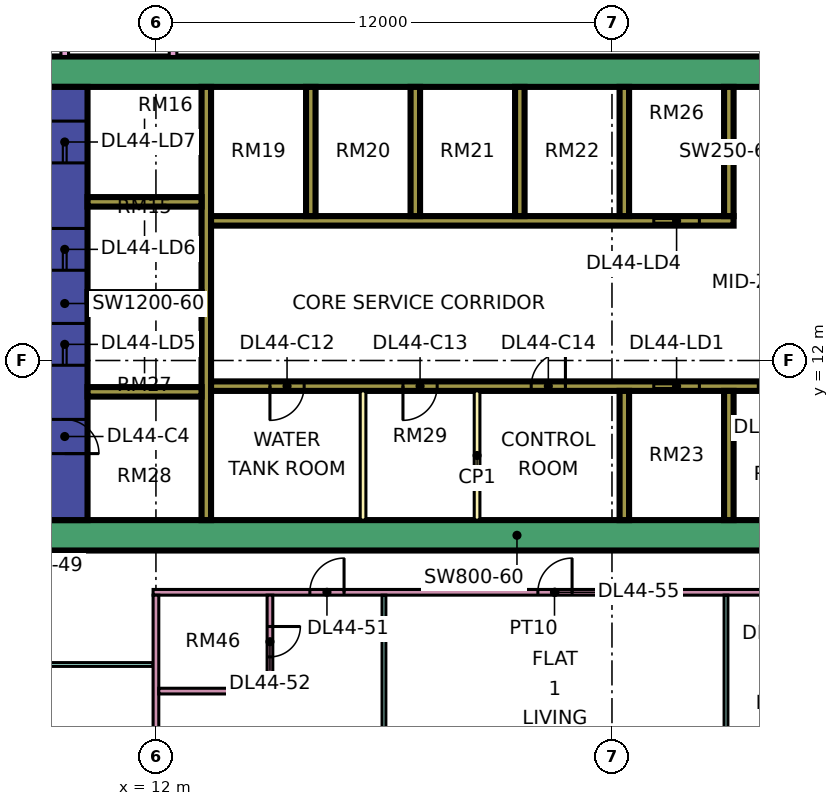
"""IFC4 building model, lengths in metres.
Left out: names, types, materials, properties, quantities, classifications, styles, units other than length and angle.
Written with IfcOpenShell. Run it as: python <this file> out.ifc"""

import sys

from ifc_helpers import new_model, si_unit, direction, frame, frame_2d, origin, place, context, subcontext, project, spatial, rectangle, extrude, element, fill, save


model = new_model("IFC4")
c1 = context("Model", 3, precision=1e-05, world=origin(), true_north=direction((0.0, 1.0)))
c2 = subcontext(c1, "Body", "Model", "MODEL_VIEW")
j1 = project(units=[si_unit("LENGTHUNIT", "METRE"), si_unit("PLANEANGLEUNIT", "RADIAN")], contexts=[c1])
p1 = place(None, origin())
s1 = spatial("IfcSite", under=j1, at=p1, CompositionType="ELEMENT")
p2 = place(p1, origin())
s2 = spatial("IfcBuilding", under=s1, at=p2, CompositionType="ELEMENT")
p3 = place(p2, frame((0.0, 0.0, 191.15)))
s3 = spatial("IfcBuildingStorey", under=s2, at=p3, CompositionType="ELEMENT", Elevation=191.15)
p4 = place(p3, frame((9.0, 7.4, 0.0), z_axis=(0.0, 0.0, 1.0), x_axis=(1.0, 0.0, 0.0)))
e1 = element("IfcWall", 1, at=p4, inside=s3, PredefinedType="SHEAR", context=c2, shape_type="SweptSolid", body=[
    extrude(rectangle(XDim=25.0, YDim=0.8, at=frame_2d((12.5, 0.0))), origin(), (0.0, 0.0, 1.0), 3.75),
])
p5 = place(p3, frame((9.0, 19.6, 0.0), z_axis=(0.0, 0.0, 1.0), x_axis=(1.0, 0.0, 0.0)))
e2 = element("IfcWall", 2, at=p5, inside=s3, PredefinedType="SHEAR", context=c2, shape_type="SweptSolid", body=[
    extrude(rectangle(XDim=25.0, YDim=0.8, at=frame_2d((12.5, 0.0))), origin(), (0.0, 0.0, 1.0), 3.75),
])
p6 = place(p5, frame((19.1, 0.0, 0.0)))
e3 = element("IfcOpeningElement", 3, at=p6, cuts=e2, PredefinedType="OPENING", context=c2, shape_type="SweptSolid", body=[
    extrude(rectangle(XDim=1.8, YDim=2.4, at=frame_2d((0.9, 1.2))), frame((0.0, 0.41, 0.0), z_axis=(0.0, -1.0, 0.0), x_axis=(1.0, 0.0, 0.0)), (0.0, 0.0, 1.0), 0.82),
])
p7 = place(p3, frame((9.6, 7.8, 0.0), z_axis=(0.0, 0.0, 1.0), x_axis=(0.0, 1.0, 0.0)))
e4 = element("IfcWall", 4, at=p7, inside=s3, PredefinedType="SHEAR", context=c2, shape_type="SweptSolid", body=[
    extrude(rectangle(XDim=11.4, YDim=1.2, at=frame_2d((5.7, 0.0))), origin(), (0.0, 0.0, 1.0), 3.75),
])
p8 = place(p7, frame((4.075, 0.0, 0.0)))
e5 = element("IfcOpeningElement", 5, at=p8, cuts=e4, PredefinedType="OPENING", context=c2, shape_type="SweptSolid", body=[
    extrude(rectangle(XDim=1.1, YDim=2.2, at=frame_2d((0.55, 1.1))), frame((0.0, 0.61, 0.0), z_axis=(0.0, -1.0, 0.0), x_axis=(1.0, 0.0, 0.0)), (0.0, 0.0, 1.0), 1.22),
])
p9 = place(p7, frame((6.575, 0.0, 0.0)))
e6 = element("IfcOpeningElement", 6, at=p9, cuts=e4, PredefinedType="OPENING", context=c2, shape_type="SweptSolid", body=[
    extrude(rectangle(XDim=1.1, YDim=2.2, at=frame_2d((0.55, 1.1))), frame((0.0, 0.61, 0.0), z_axis=(0.0, -1.0, 0.0), x_axis=(1.0, 0.0, 0.0)), (0.0, 0.0, 1.0), 1.22),
])
p10 = place(p7, frame((9.4, 0.0, 0.0)))
e7 = element("IfcOpeningElement", 7, at=p10, cuts=e4, PredefinedType="OPENING", context=c2, shape_type="SweptSolid", body=[
    extrude(rectangle(XDim=1.1, YDim=2.2, at=frame_2d((0.55, 1.1))), frame((0.0, 0.61, 0.0), z_axis=(0.0, -1.0, 0.0), x_axis=(1.0, 0.0, 0.0)), (0.0, 0.0, 1.0), 1.22),
])
p11 = place(p7, frame((1.75, 0.0, 0.0)))
e8 = element("IfcOpeningElement", 8, at=p11, cuts=e4, PredefinedType="OPENING", context=c2, shape_type="SweptSolid", body=[
    extrude(rectangle(XDim=0.9, YDim=2.1, at=frame_2d((0.45, 1.05))), frame((0.0, 0.61, 0.0), z_axis=(0.0, -1.0, 0.0), x_axis=(1.0, 0.0, 0.0)), (0.0, 0.0, 1.0), 1.22),
])
p12 = place(p3, frame((13.325, 7.8, 0.0), z_axis=(0.0, 0.0, 1.0), x_axis=(0.0, 1.0, 0.0)))
e9 = element("IfcWall", 9, at=p12, inside=s3, PredefinedType="SHEAR", context=c2, shape_type="SweptSolid", body=[
    extrude(rectangle(XDim=11.4, YDim=0.25, at=frame_2d((5.7, 0.0))), origin(), (0.0, 0.0, 1.0), 3.75),
])
p13 = place(p3, frame((13.45, 11.325, 0.0), z_axis=(0.0, 0.0, 1.0), x_axis=(1.0, 0.0, 0.0)))
e10 = element("IfcWall", 10, at=p13, inside=s3, PredefinedType="SHEAR", context=c2, shape_type="SweptSolid", body=[
    extrude(rectangle(XDim=19.75, YDim=0.25, at=frame_2d((9.875, 0.0))), origin(), (0.0, 0.0, 1.0), 3.75),
])
p14 = place(p13, frame((11.65, 0.0, 0.0)))
e11 = element("IfcOpeningElement", 11, at=p14, cuts=e10, PredefinedType="OPENING", context=c2, shape_type="SweptSolid", body=[
    extrude(rectangle(XDim=1.2, YDim=2.2, at=frame_2d((0.6, 1.1))), frame((0.0, 0.135, 0.0), z_axis=(0.0, -1.0, 0.0), x_axis=(1.0, 0.0, 0.0)), (0.0, 0.0, 1.0), 0.27),
])
p15 = place(p13, frame((14.4, 0.0, 0.0)))
e12 = element("IfcOpeningElement", 12, at=p15, cuts=e10, PredefinedType="OPENING", context=c2, shape_type="SweptSolid", body=[
    extrude(rectangle(XDim=1.2, YDim=2.2, at=frame_2d((0.6, 1.1))), frame((0.0, 0.135, 0.0), z_axis=(0.0, -1.0, 0.0), x_axis=(1.0, 0.0, 0.0)), (0.0, 0.0, 1.0), 0.27),
])
p16 = place(p13, frame((17.15, 0.0, 0.0)))
e13 = element("IfcOpeningElement", 13, at=p16, cuts=e10, PredefinedType="OPENING", context=c2, shape_type="SweptSolid", body=[
    extrude(rectangle(XDim=1.2, YDim=2.2, at=frame_2d((0.6, 1.1))), frame((0.0, 0.135, 0.0), z_axis=(0.0, -1.0, 0.0), x_axis=(1.0, 0.0, 0.0)), (0.0, 0.0, 1.0), 0.27),
])
p17 = place(p13, frame((1.55, 0.0, 0.0)))
e14 = element("IfcOpeningElement", 14, at=p17, cuts=e10, PredefinedType="OPENING", context=c2, shape_type="SweptSolid", body=[
    extrude(rectangle(XDim=0.9, YDim=2.1, at=frame_2d((0.45, 1.05))), frame((0.0, 0.135, 0.0), z_axis=(0.0, -1.0, 0.0), x_axis=(1.0, 0.0, 0.0)), (0.0, 0.0, 1.0), 0.27),
])
p18 = place(p13, frame((5.05, 0.0, 0.0)))
e15 = element("IfcOpeningElement", 15, at=p18, cuts=e10, PredefinedType="OPENING", context=c2, shape_type="SweptSolid", body=[
    extrude(rectangle(XDim=0.9, YDim=2.1, at=frame_2d((0.45, 1.05))), frame((0.0, 0.135, 0.0), z_axis=(0.0, -1.0, 0.0), x_axis=(1.0, 0.0, 0.0)), (0.0, 0.0, 1.0), 0.27),
])
p19 = place(p13, frame((8.425, 0.0, 0.0)))
e16 = element("IfcOpeningElement", 16, at=p19, cuts=e10, PredefinedType="OPENING", context=c2, shape_type="SweptSolid", body=[
    extrude(rectangle(XDim=0.9, YDim=2.1, at=frame_2d((0.45, 1.05))), frame((0.0, 0.135, 0.0), z_axis=(0.0, -1.0, 0.0), x_axis=(1.0, 0.0, 0.0)), (0.0, 0.0, 1.0), 0.27),
])
p20 = place(p3, frame((13.45, 15.675, 0.0), z_axis=(0.0, 0.0, 1.0), x_axis=(1.0, 0.0, 0.0)))
e17 = element("IfcWall", 17, at=p20, inside=s3, PredefinedType="SHEAR", context=c2, shape_type="SweptSolid", body=[
    extrude(rectangle(XDim=13.75, YDim=0.25, at=frame_2d((6.875, 0.0))), origin(), (0.0, 0.0, 1.0), 3.75),
])
p21 = place(p20, frame((11.65, 0.0, 0.0)))
e18 = element("IfcOpeningElement", 18, at=p21, cuts=e17, PredefinedType="OPENING", context=c2, shape_type="SweptSolid", body=[
    extrude(rectangle(XDim=1.2, YDim=2.2, at=frame_2d((0.6, 1.1))), frame((0.0, 0.135, 0.0), z_axis=(0.0, -1.0, 0.0), x_axis=(1.0, 0.0, 0.0)), (0.0, 0.0, 1.0), 0.27),
])
for number, where, z_axis, x_axis in (
    (19, (10.2, 11.175, 0.0), (0.0, 0.0, 1.0), (1.0, 0.0, 0.0)),
    (20, (10.2, 13.675, 0.0), (0.0, 0.0, 1.0), (1.0, 0.0, 0.0)),
    (21, (10.2, 16.175, 0.0), (0.0, 0.0, 1.0), (1.0, 0.0, 0.0)),
):
    element("IfcWall", number, at=place(p3, frame(where, z_axis=z_axis, x_axis=x_axis)), inside=s3, PredefinedType="SHEAR", context=c2, shape_type="SweptSolid", body=[
        extrude(rectangle(XDim=3.0, YDim=0.25, at=frame_2d((1.5, 0.0))), origin(), (0.0, 0.0, 1.0), 3.75),
    ])
for number, where, z_axis, x_axis in (
    (22, (24.325, 7.8, 0.0), (0.0, 0.0, 1.0), (0.0, 1.0, 0.0)),
    (23, (27.075, 7.8, 0.0), (0.0, 0.0, 1.0), (0.0, 1.0, 0.0)),
    (24, (16.075, 15.8, 0.0), (0.0, 0.0, 1.0), (0.0, 1.0, 0.0)),
    (25, (18.825, 15.8, 0.0), (0.0, 0.0, 1.0), (0.0, 1.0, 0.0)),
    (26, (21.575, 15.8, 0.0), (0.0, 0.0, 1.0), (0.0, 1.0, 0.0)),
    (27, (24.325, 15.8, 0.0), (0.0, 0.0, 1.0), (0.0, 1.0, 0.0)),
    (28, (27.075, 15.8, 0.0), (0.0, 0.0, 1.0), (0.0, 1.0, 0.0)),
):
    element("IfcWall", number, at=place(p3, frame(where, z_axis=z_axis, x_axis=x_axis)), inside=s3, PredefinedType="SHEAR", context=c2, shape_type="SweptSolid", body=[
        extrude(rectangle(XDim=3.4, YDim=0.25, at=frame_2d((1.7, 0.0))), origin(), (0.0, 0.0, 1.0), 3.75),
    ])
p22 = place(p3, frame((-1.447, 12.553, 0.0), z_axis=(0.0, 0.0, 1.0), x_axis=(0.707106781187, -0.707106781187, 0.0)))
e29 = element("IfcWall", 29, at=p22, inside=s3, PredefinedType="SOLIDWALL", context=c2, shape_type="SweptSolid", body=[
    extrude(rectangle(XDim=19.799, YDim=0.15, at=frame_2d((9.899, 0.0))), origin(), (0.0, 0.0, 1.0), 3.35),
])
p23 = place(p22, frame((2.212, 0.0, 0.45)))
e30 = element("IfcOpeningElement", 30, at=p23, cuts=e29, PredefinedType="OPENING", context=c2, shape_type="SweptSolid", body=[
    extrude(rectangle(XDim=3.0, YDim=2.4, at=frame_2d((1.5, 1.2))), frame((0.0, 0.085, 0.0), z_axis=(0.0, -1.0, 0.0), x_axis=(1.0, 0.0, 0.0)), (0.0, 0.0, 1.0), 0.17),
])
p24 = place(p22, frame((10.216, 0.0, 0.45)))
e31 = element("IfcOpeningElement", 31, at=p24, cuts=e29, PredefinedType="OPENING", context=c2, shape_type="SweptSolid", body=[
    extrude(rectangle(XDim=3.0, YDim=2.4, at=frame_2d((1.5, 1.2))), frame((0.0, 0.085, 0.0), z_axis=(0.0, -1.0, 0.0), x_axis=(1.0, 0.0, 0.0)), (0.0, 0.0, 1.0), 0.17),
])
for number, where, z_axis, x_axis in (
    (32, (17.45, 7.8, 0.0), (0.0, 0.0, 1.0), (0.0, 1.0, 0.0)),
    (33, (20.45, 7.8, 0.0), (0.0, 0.0, 1.0), (0.0, 1.0, 0.0)),
):
    element("IfcWall", number, at=place(p3, frame(where, z_axis=z_axis, x_axis=x_axis)), inside=s3, PredefinedType="PARTITIONING", context=c2, shape_type="SweptSolid", body=[
        extrude(rectangle(XDim=3.4, YDim=0.15, at=frame_2d((1.7, 0.0))), origin(), (0.0, 0.0, 1.0), 3.35),
    ])
p25 = place(p3, frame((9.05, 4.0, 0.0), z_axis=(0.0, 0.0, 1.0), x_axis=(1.0, 0.0, 0.0)))
e34 = element("IfcWall", 34, at=p25, inside=s3, PredefinedType="PARTITIONING", context=c2, shape_type="SweptSolid", body=[
    extrude(rectangle(XDim=2.875, YDim=0.1, at=frame_2d((1.438, 0.0))), origin(), (0.0, 0.0, 1.0), 3.35),
])
p26 = place(p3, frame((9.6, 20.0, 0.0), z_axis=(0.0, 0.0, 1.0), x_axis=(0.0, 1.0, 0.0)))
e35 = element("IfcWall", 35, at=p26, inside=s3, PredefinedType="PARTITIONING", context=c2, shape_type="SweptSolid", body=[
    extrude(rectangle(XDim=42.926, YDim=0.2, at=frame_2d((21.463, 0.0))), origin(), (0.0, 0.0, 1.0), 3.35),
])
p27 = place(p26, frame((31.65, 0.0, 0.0)))
e36 = element("IfcOpeningElement", 36, at=p27, cuts=e35, PredefinedType="OPENING", context=c2, shape_type="SweptSolid", body=[
    extrude(rectangle(XDim=1.0, YDim=2.1, at=frame_2d((0.5, 1.05))), frame((0.0, 0.11, 0.0), z_axis=(0.0, -1.0, 0.0), x_axis=(1.0, 0.0, 0.0)), (0.0, 0.0, 1.0), 0.22),
])
p28 = place(p26, frame((0.6, 0.0, 0.0)))
e37 = element("IfcOpeningElement", 37, at=p28, cuts=e35, PredefinedType="OPENING", context=c2, shape_type="SweptSolid", body=[
    extrude(rectangle(XDim=1.2, YDim=2.1, at=frame_2d((0.6, 1.05))), frame((0.0, 0.11, 0.0), z_axis=(0.0, -1.0, 0.0), x_axis=(1.0, 0.0, 0.0)), (0.0, 0.0, 1.0), 0.22),
])
p29 = place(p26, frame((13.65, 0.0, 0.0)))
e38 = element("IfcOpeningElement", 38, at=p29, cuts=e35, PredefinedType="OPENING", context=c2, shape_type="SweptSolid", body=[
    extrude(rectangle(XDim=1.0, YDim=2.1, at=frame_2d((0.5, 1.05))), frame((0.0, 0.11, 0.0), z_axis=(0.0, -1.0, 0.0), x_axis=(1.0, 0.0, 0.0)), (0.0, 0.0, 1.0), 0.22),
])
p30 = place(p3, frame((11.925, 5.9, 0.0), z_axis=(0.0, 0.0, 1.0), x_axis=(1.0, 0.0, 0.0)))
e39 = element("IfcWall", 39, at=p30, inside=s3, PredefinedType="PARTITIONING", context=c2, shape_type="SweptSolid", body=[
    extrude(rectangle(XDim=21.125, YDim=0.15, at=frame_2d((10.562, 0.0))), origin(), (0.0, 0.0, 1.0), 3.35),
])
p31 = place(p30, frame((16.125, 0.0, 0.0)))
e40 = element("IfcOpeningElement", 40, at=p31, cuts=e39, PredefinedType="OPENING", context=c2, shape_type="SweptSolid", body=[
    extrude(rectangle(XDim=0.9, YDim=2.1, at=frame_2d((0.45, 1.05))), frame((0.0, 0.085, 0.0), z_axis=(0.0, -1.0, 0.0), x_axis=(1.0, 0.0, 0.0)), (0.0, 0.0, 1.0), 0.17),
])
p32 = place(p30, frame((4.125, 0.0, 0.0)))
e41 = element("IfcOpeningElement", 41, at=p32, cuts=e39, PredefinedType="OPENING", context=c2, shape_type="SweptSolid", body=[
    extrude(rectangle(XDim=0.9, YDim=2.1, at=frame_2d((0.45, 1.05))), frame((0.0, 0.085, 0.0), z_axis=(0.0, -1.0, 0.0), x_axis=(1.0, 0.0, 0.0)), (0.0, 0.0, 1.0), 0.17),
])
p33 = place(p30, frame((10.125, 0.0, 0.0)))
e42 = element("IfcOpeningElement", 42, at=p33, cuts=e39, PredefinedType="OPENING", context=c2, shape_type="SweptSolid", body=[
    extrude(rectangle(XDim=0.9, YDim=2.1, at=frame_2d((0.45, 1.05))), frame((0.0, 0.085, 0.0), z_axis=(0.0, -1.0, 0.0), x_axis=(1.0, 0.0, 0.0)), (0.0, 0.0, 1.0), 0.17),
])
p34 = place(p3, frame((12.0, -0.788, 0.0), z_axis=(0.0, 0.0, 1.0), x_axis=(0.0, 1.0, 0.0)))
e43 = element("IfcWall", 43, at=p34, inside=s3, PredefinedType="PARTITIONING", context=c2, shape_type="SweptSolid", body=[
    extrude(rectangle(XDim=6.613, YDim=0.15, at=frame_2d((3.306, 0.0))), origin(), (0.0, 0.0, 1.0), 3.35),
])
p35 = place(p3, frame((12.075, 3.3, 0.0), z_axis=(0.0, 0.0, 1.0), x_axis=(1.0, 0.0, 0.0)))
e44 = element("IfcWall", 44, at=p35, inside=s3, PredefinedType="PARTITIONING", context=c2, shape_type="SweptSolid", body=[
    extrude(rectangle(XDim=3.0, YDim=0.15, at=frame_2d((1.5, 0.0))), origin(), (0.0, 0.0, 1.0), 3.35),
])
p36 = place(p3, frame((12.45, 20.0, 0.0), z_axis=(0.0, 0.0, 1.0), x_axis=(0.0, 1.0, 0.0)))
e45 = element("IfcWall", 45, at=p36, inside=s3, PredefinedType="PARTITIONING", context=c2, shape_type="SweptSolid", body=[
    extrude(rectangle(XDim=43.0, YDim=0.2, at=frame_2d((21.5, 0.0))), origin(), (0.0, 0.0, 1.0), 3.35),
])
p37 = place(p36, frame((6.7, 0.0, 0.0)))
e46 = element("IfcOpeningElement", 46, at=p37, cuts=e45, PredefinedType="OPENING", context=c2, shape_type="SweptSolid", body=[
    extrude(rectangle(XDim=1.6, YDim=2.1, at=frame_2d((0.8, 1.05))), frame((0.0, 0.11, 0.0), z_axis=(0.0, -1.0, 0.0), x_axis=(1.0, 0.0, 0.0)), (0.0, 0.0, 1.0), 0.22),
])
p38 = place(p36, frame((12.95, 0.0, 0.0)))
e47 = element("IfcOpeningElement", 47, at=p38, cuts=e45, PredefinedType="OPENING", context=c2, shape_type="SweptSolid", body=[
    extrude(rectangle(XDim=1.0, YDim=2.1, at=frame_2d((0.5, 1.05))), frame((0.0, 0.11, 0.0), z_axis=(0.0, -1.0, 0.0), x_axis=(1.0, 0.0, 0.0)), (0.0, 0.0, 1.0), 0.22),
])
p39 = place(p36, frame((16.9, 0.0, 0.0)))
e48 = element("IfcOpeningElement", 48, at=p39, cuts=e45, PredefinedType="OPENING", context=c2, shape_type="SweptSolid", body=[
    extrude(rectangle(XDim=1.0, YDim=2.1, at=frame_2d((0.5, 1.05))), frame((0.0, 0.11, 0.0), z_axis=(0.0, -1.0, 0.0), x_axis=(1.0, 0.0, 0.0)), (0.0, 0.0, 1.0), 0.22),
])
p40 = place(p36, frame((40.75, 0.0, 0.0)))
e49 = element("IfcOpeningElement", 49, at=p40, cuts=e45, PredefinedType="OPENING", context=c2, shape_type="SweptSolid", body=[
    extrude(rectangle(XDim=1.0, YDim=2.1, at=frame_2d((0.5, 1.05))), frame((0.0, 0.11, 0.0), z_axis=(0.0, -1.0, 0.0), x_axis=(1.0, 0.0, 0.0)), (0.0, 0.0, 1.0), 0.22),
])
p41 = place(p36, frame((1.15, 0.0, 0.0)))
e50 = element("IfcOpeningElement", 50, at=p41, cuts=e45, PredefinedType="OPENING", context=c2, shape_type="SweptSolid", body=[
    extrude(rectangle(XDim=1.8, YDim=2.1, at=frame_2d((0.9, 1.05))), frame((0.0, 0.11, 0.0), z_axis=(0.0, -1.0, 0.0), x_axis=(1.0, 0.0, 0.0)), (0.0, 0.0, 1.0), 0.22),
])
p42 = place(p36, frame((28.6, 0.0, 0.0)))
e51 = element("IfcOpeningElement", 51, at=p42, cuts=e45, PredefinedType="OPENING", context=c2, shape_type="SweptSolid", body=[
    extrude(rectangle(XDim=1.8, YDim=2.1, at=frame_2d((0.9, 1.05))), frame((0.0, 0.11, 0.0), z_axis=(0.0, -1.0, 0.0), x_axis=(1.0, 0.0, 0.0)), (0.0, 0.0, 1.0), 0.22),
])
p43 = place(p3, frame((15.0, 3.375, 0.0), z_axis=(0.0, 0.0, 1.0), x_axis=(0.0, 1.0, 0.0)))
e52 = element("IfcWall", 52, at=p43, inside=s3, PredefinedType="PARTITIONING", context=c2, shape_type="SweptSolid", body=[
    extrude(rectangle(XDim=2.45, YDim=0.15, at=frame_2d((1.225, 0.0))), origin(), (0.0, 0.0, 1.0), 3.35),
])
p44 = place(p43, frame((0.825, 0.0, 0.0)))
e53 = element("IfcOpeningElement", 53, at=p44, cuts=e52, PredefinedType="OPENING", context=c2, shape_type="SweptSolid", body=[
    extrude(rectangle(XDim=0.8, YDim=2.1, at=frame_2d((0.4, 1.05))), frame((0.0, 0.085, 0.0), z_axis=(0.0, -1.0, 0.0), x_axis=(1.0, 0.0, 0.0)), (0.0, 0.0, 1.0), 0.17),
])
p45 = place(p3, frame((18.0, -1.35, 0.0), z_axis=(0.0, 0.0, 1.0), x_axis=(0.0, 1.0, 0.0)))
e54 = element("IfcWall", 54, at=p45, inside=s3, PredefinedType="PARTITIONING", context=c2, shape_type="SweptSolid", body=[
    extrude(rectangle(XDim=7.175, YDim=0.1, at=frame_2d((3.587, 0.0))), origin(), (0.0, 0.0, 1.0), 3.35),
])
p46 = place(p3, frame((27.0, 0.074, 0.0), z_axis=(0.0, 0.0, 1.0), x_axis=(0.0, 1.0, 0.0)))
e55 = element("IfcWall", 55, at=p46, inside=s3, PredefinedType="PARTITIONING", context=c2, shape_type="SweptSolid", body=[
    extrude(rectangle(XDim=5.751, YDim=0.1, at=frame_2d((2.875, 0.0))), origin(), (0.0, 0.0, 1.0), 3.35),
])
p47 = place(p14, origin())
e56 = element("IfcDoor", 56, at=p47, inside=s3, OperationType="DOUBLE_DOOR_SLIDING", PredefinedType="DOOR", context=c2, shape_type="SweptSolid", body=[
    extrude(rectangle(XDim=1.2, YDim=2.2, at=frame_2d((0.6, 1.1))), frame((0.0, 0.025, 0.0), z_axis=(0.0, -1.0, 0.0), x_axis=(1.0, 0.0, 0.0)), (0.0, 0.0, 1.0), 0.05),
])
fill(e11, e56)
p48 = place(p15, origin())
e57 = element("IfcDoor", 57, at=p48, inside=s3, OperationType="DOUBLE_DOOR_SLIDING", PredefinedType="DOOR", context=c2, shape_type="SweptSolid", body=[
    extrude(rectangle(XDim=1.2, YDim=2.2, at=frame_2d((0.6, 1.1))), frame((0.0, 0.025, 0.0), z_axis=(0.0, -1.0, 0.0), x_axis=(1.0, 0.0, 0.0)), (0.0, 0.0, 1.0), 0.05),
])
fill(e12, e57)
p49 = place(p21, origin())
e58 = element("IfcDoor", 58, at=p49, inside=s3, OperationType="DOUBLE_DOOR_SLIDING", PredefinedType="DOOR", context=c2, shape_type="SweptSolid", body=[
    extrude(rectangle(XDim=1.2, YDim=2.2, at=frame_2d((0.6, 1.1))), frame((0.0, 0.025, 0.0), z_axis=(0.0, -1.0, 0.0), x_axis=(1.0, 0.0, 0.0)), (0.0, 0.0, 1.0), 0.05),
])
fill(e18, e58)
p50 = place(p8, origin())
e59 = element("IfcDoor", 59, at=p50, inside=s3, OperationType="DOUBLE_DOOR_SLIDING", PredefinedType="DOOR", context=c2, shape_type="SweptSolid", body=[
    extrude(rectangle(XDim=1.1, YDim=2.2, at=frame_2d((0.55, 1.1))), frame((0.0, 0.025, 0.0), z_axis=(0.0, -1.0, 0.0), x_axis=(1.0, 0.0, 0.0)), (0.0, 0.0, 1.0), 0.05),
])
fill(e5, e59)
p51 = place(p9, origin())
e60 = element("IfcDoor", 60, at=p51, inside=s3, OperationType="DOUBLE_DOOR_SLIDING", PredefinedType="DOOR", context=c2, shape_type="SweptSolid", body=[
    extrude(rectangle(XDim=1.1, YDim=2.2, at=frame_2d((0.55, 1.1))), frame((0.0, 0.025, 0.0), z_axis=(0.0, -1.0, 0.0), x_axis=(1.0, 0.0, 0.0)), (0.0, 0.0, 1.0), 0.05),
])
fill(e6, e60)
p52 = place(p10, origin())
e61 = element("IfcDoor", 61, at=p52, inside=s3, OperationType="DOUBLE_DOOR_SLIDING", PredefinedType="DOOR", context=c2, shape_type="SweptSolid", body=[
    extrude(rectangle(XDim=1.1, YDim=2.2, at=frame_2d((0.55, 1.1))), frame((0.0, 0.025, 0.0), z_axis=(0.0, -1.0, 0.0), x_axis=(1.0, 0.0, 0.0)), (0.0, 0.0, 1.0), 0.05),
])
fill(e7, e61)
p53 = place(p11, frame((0.9, 0.0, 0.0), z_axis=(0.0, 0.0, 1.0), x_axis=(-1.0, 0.0, 0.0)))
e62 = element("IfcDoor", 62, at=p53, inside=s3, OperationType="SINGLE_SWING_LEFT", PredefinedType="DOOR", context=c2, shape_type="SweptSolid", body=[
    extrude(rectangle(XDim=0.9, YDim=2.1, at=frame_2d((0.45, 1.05))), frame((0.0, 0.025, 0.0), z_axis=(0.0, -1.0, 0.0), x_axis=(1.0, 0.0, 0.0)), (0.0, 0.0, 1.0), 0.05),
])
fill(e8, e62)
p54 = place(p17, frame((0.9, 0.0, 0.0), z_axis=(0.0, 0.0, 1.0), x_axis=(-1.0, 0.0, 0.0)))
e63 = element("IfcDoor", 63, at=p54, inside=s3, OperationType="SINGLE_SWING_LEFT", PredefinedType="DOOR", context=c2, shape_type="SweptSolid", body=[
    extrude(rectangle(XDim=0.9, YDim=2.1, at=frame_2d((0.45, 1.05))), frame((0.0, 0.025, 0.0), z_axis=(0.0, -1.0, 0.0), x_axis=(1.0, 0.0, 0.0)), (0.0, 0.0, 1.0), 0.05),
])
fill(e14, e63)
p55 = place(p18, frame((0.9, 0.0, 0.0), z_axis=(0.0, 0.0, 1.0), x_axis=(-1.0, 0.0, 0.0)))
e64 = element("IfcDoor", 64, at=p55, inside=s3, OperationType="SINGLE_SWING_LEFT", PredefinedType="DOOR", context=c2, shape_type="SweptSolid", body=[
    extrude(rectangle(XDim=0.9, YDim=2.1, at=frame_2d((0.45, 1.05))), frame((0.0, 0.025, 0.0), z_axis=(0.0, -1.0, 0.0), x_axis=(1.0, 0.0, 0.0)), (0.0, 0.0, 1.0), 0.05),
])
fill(e15, e64)
p56 = place(p19, frame((0.9, 0.0, 0.0), z_axis=(0.0, 0.0, 1.0), x_axis=(-1.0, 0.0, 0.0)))
e65 = element("IfcDoor", 65, at=p56, inside=s3, OperationType="SINGLE_SWING_RIGHT", PredefinedType="DOOR", context=c2, shape_type="SweptSolid", body=[
    extrude(rectangle(XDim=0.9, YDim=2.1, at=frame_2d((0.45, 1.05))), frame((0.0, 0.025, 0.0), z_axis=(0.0, -1.0, 0.0), x_axis=(1.0, 0.0, 0.0)), (0.0, 0.0, 1.0), 0.05),
])
fill(e16, e65)
p57 = place(p32, frame((0.9, 0.0, 0.0), z_axis=(0.0, 0.0, 1.0), x_axis=(-1.0, 0.0, 0.0)))
e66 = element("IfcDoor", 66, at=p57, inside=s3, OperationType="SINGLE_SWING_RIGHT", PredefinedType="DOOR", context=c2, shape_type="SweptSolid", body=[
    extrude(rectangle(XDim=0.9, YDim=2.1, at=frame_2d((0.45, 1.05))), frame((0.0, 0.025, 0.0), z_axis=(0.0, -1.0, 0.0), x_axis=(1.0, 0.0, 0.0)), (0.0, 0.0, 1.0), 0.05),
])
fill(e41, e66)
p58 = place(p44, origin())
e67 = element("IfcDoor", 67, at=p58, inside=s3, OperationType="SINGLE_SWING_RIGHT", PredefinedType="DOOR", context=c2, shape_type="SweptSolid", body=[
    extrude(rectangle(XDim=0.8, YDim=2.1, at=frame_2d((0.4, 1.05))), frame((0.0, 0.025, 0.0), z_axis=(0.0, -1.0, 0.0), x_axis=(1.0, 0.0, 0.0)), (0.0, 0.0, 1.0), 0.05),
])
fill(e53, e67)
p59 = place(p33, frame((0.9, 0.0, 0.0), z_axis=(0.0, 0.0, 1.0), x_axis=(-1.0, 0.0, 0.0)))
e68 = element("IfcDoor", 68, at=p59, inside=s3, OperationType="SINGLE_SWING_RIGHT", PredefinedType="DOOR", context=c2, shape_type="SweptSolid", body=[
    extrude(rectangle(XDim=0.9, YDim=2.1, at=frame_2d((0.45, 1.05))), frame((0.0, 0.025, 0.0), z_axis=(0.0, -1.0, 0.0), x_axis=(1.0, 0.0, 0.0)), (0.0, 0.0, 1.0), 0.05),
])
fill(e42, e68)
save(model, sys.argv[1])
